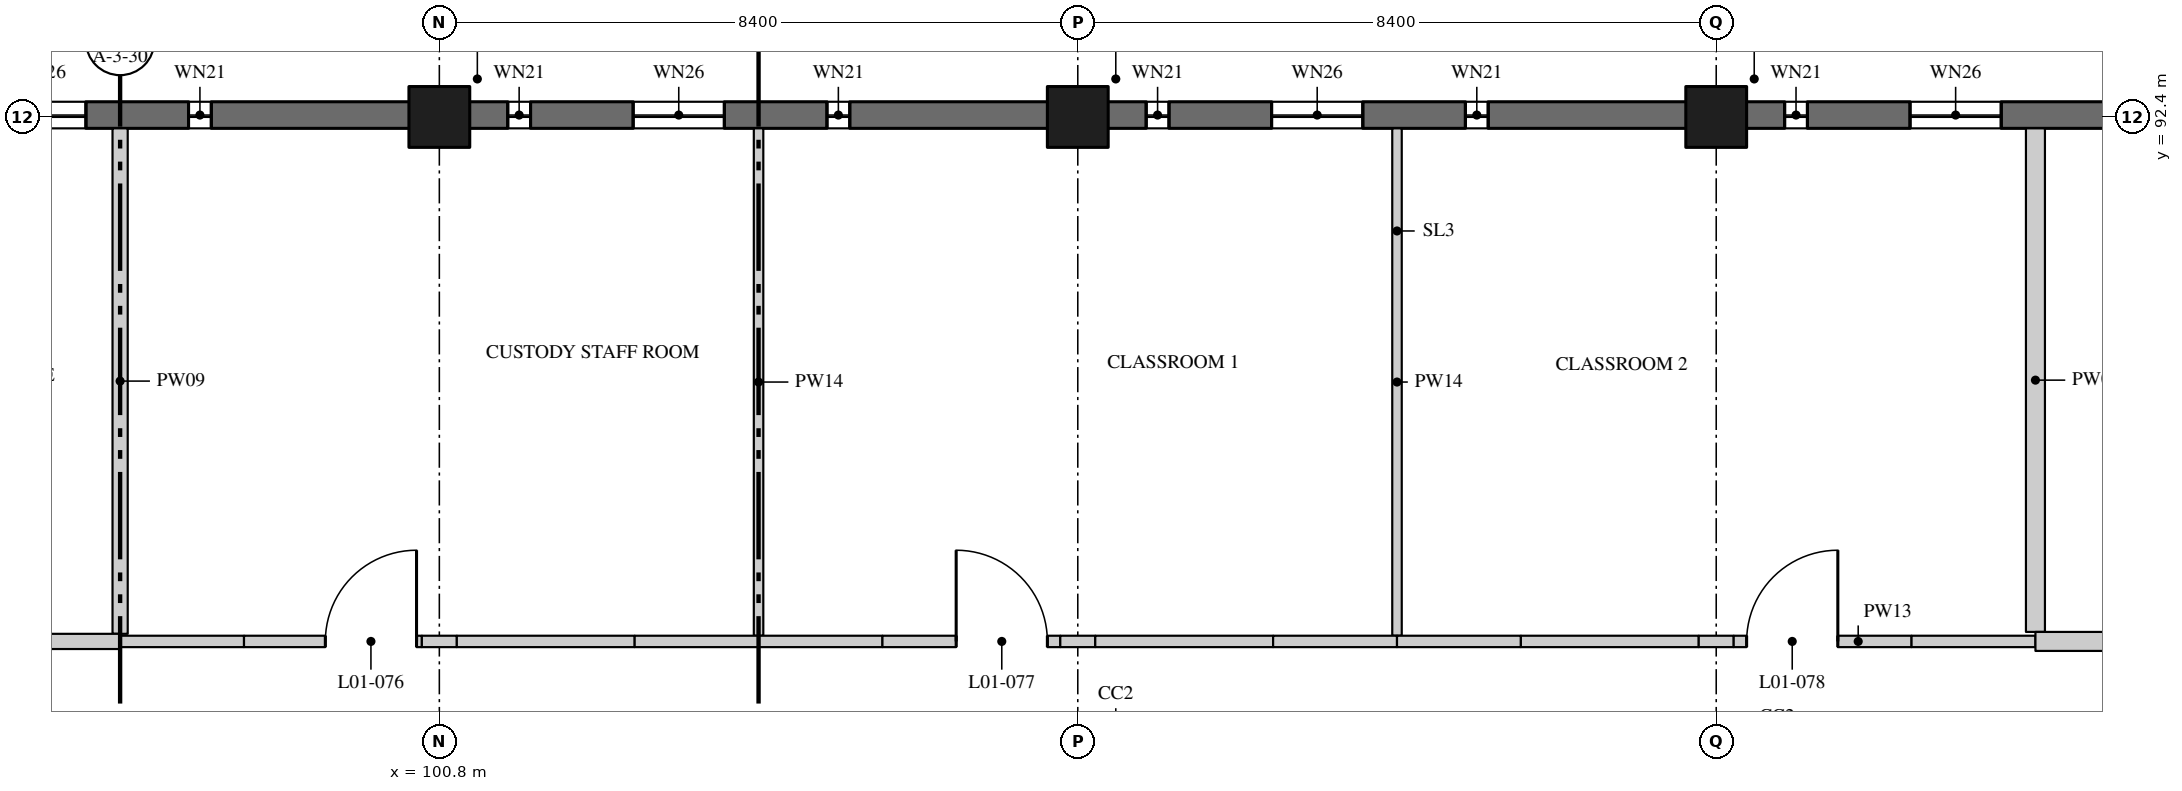
"""IFC4 building model, lengths in metres.
Left out: names, types, materials, properties, quantities, classifications, styles, units other than length and angle.
Written with IfcOpenShell. Run it as: python <this file> out.ifc"""

import sys

from ifc_helpers import new_model, si_unit, direction, frame, frame_2d, origin, origin_2d, place, context, subcontext, project, spatial, rectangle, extrude, element, fill, save


model = new_model("IFC4")
c1 = context("Model", 3, precision=1e-05, world=origin(), true_north=direction((0.0, 1.0)))
c2 = subcontext(c1, "Body", "Model", "MODEL_VIEW")
j1 = project(units=[si_unit("LENGTHUNIT", "METRE"), si_unit("PLANEANGLEUNIT", "RADIAN")], contexts=[c1])
p1 = place(None, origin())
s1 = spatial("IfcSite", under=j1, at=p1, CompositionType="ELEMENT")
p2 = place(p1, origin())
s2 = spatial("IfcBuilding", under=s1, at=p2, CompositionType="ELEMENT")
p3 = place(p2, frame((0.0, 0.0, 5.4)))
s3 = spatial("IfcBuildingStorey", under=s2, at=p3, CompositionType="ELEMENT", Elevation=5.4)
for number, where, z_axis, x_axis in (
    (1, (100.8, 92.4, 0.0), (0.0, 0.0, 1.0), (1.0, 0.0, 0.0)),
    (2, (109.2, 92.4, 0.0), (0.0, 0.0, 1.0), (1.0, 0.0, 0.0)),
    (3, (117.6, 92.4, 0.0), (0.0, 0.0, 1.0), (1.0, 0.0, 0.0)),
):
    element("IfcColumn", number, at=place(p3, frame(where, z_axis=z_axis, x_axis=x_axis)), inside=s3, PredefinedType="COLUMN", context=c2, shape_type="SweptSolid", body=[
        extrude(rectangle(XDim=0.8, YDim=0.8, at=origin_2d()), origin(), (0.0, 0.0, 1.0), 4.37),
    ])
p4 = place(p3, frame((96.6, 85.6, 0.0), z_axis=(0.0, 0.0, 1.0), x_axis=(0.0, 1.0, 0.0)))
e4 = element("IfcWall", 4, at=p4, inside=s3, PredefinedType="PARTITIONING", context=c2, shape_type="SweptSolid", body=[
    extrude(rectangle(XDim=6.65, YDim=0.2, at=frame_2d((3.325, 0.0))), origin(), (0.0, 0.0, 1.0), 4.37),
])
p5 = place(p3, frame((94.895, 85.5, 0.0), z_axis=(0.0, 0.0, 1.0), x_axis=(1.0, 0.0, 0.0)))
e5 = element("IfcWall", 5, at=p5, inside=s3, PredefinedType="PARTITIONING", context=c2, shape_type="SweptSolid", body=[
    extrude(rectangle(XDim=1.705, YDim=0.2, at=frame_2d((0.853, 0.0))), origin(), (0.0, 0.0, 1.0), 3.895),
])
p6 = place(p3, frame((105.0, 85.575, 0.0), z_axis=(0.0, 0.0, 1.0), x_axis=(0.0, 1.0, 0.0)))
e6 = element("IfcWall", 6, at=p6, inside=s3, PredefinedType="PARTITIONING", context=c2, shape_type="SweptSolid", body=[
    extrude(rectangle(XDim=6.675, YDim=0.125, at=frame_2d((3.337, 0.0))), origin(), (0.0, 0.0, 1.0), 4.37),
])
p7 = place(p3, frame((96.6, 85.5, 0.0), z_axis=(0.0, 0.0, 1.0), x_axis=(1.0, 0.0, 0.0)))
e7 = element("IfcWall", 7, at=p7, inside=s3, PredefinedType="PARTITIONING", context=c2, shape_type="SweptSolid", body=[
    extrude(rectangle(XDim=1.63, YDim=0.15, at=frame_2d((0.815, 0.0))), origin(), (0.0, 0.0, 1.0), 3.895),
])
p8 = place(p3, frame((98.23, 85.5, 0.0), z_axis=(0.0, 0.0, 1.0), x_axis=(1.0, 0.0, 0.0)))
e8 = element("IfcWall", 8, at=p8, inside=s3, PredefinedType="PARTITIONING", context=c2, shape_type="SweptSolid", body=[
    extrude(rectangle(XDim=2.34, YDim=0.15, at=frame_2d((1.17, 0.0))), origin(), (0.0, 0.0, 1.0), 4.37),
])
p9 = place(p8, frame((1.07, 0.0, 0.0)))
e9 = element("IfcOpeningElement", 9, at=p9, cuts=e8, PredefinedType="OPENING", context=c2, shape_type="SweptSolid", body=[
    extrude(rectangle(XDim=1.2, YDim=2.4, at=frame_2d((0.6, 1.2))), frame((0.0, 0.085, 0.0), z_axis=(0.0, -1.0, 0.0), x_axis=(1.0, 0.0, 0.0)), (0.0, 0.0, 1.0), 0.17),
])
p10 = place(p3, frame((100.57, 85.5, 0.0), z_axis=(0.0, 0.0, 1.0), x_axis=(1.0, 0.0, 0.0)))
e10 = element("IfcWall", 10, at=p10, inside=s3, PredefinedType="PARTITIONING", context=c2, shape_type="SweptSolid", body=[
    extrude(rectangle(XDim=0.46, YDim=0.15, at=frame_2d((0.23, 0.0))), origin(), (0.0, 0.0, 1.0), 3.746),
])
p11 = place(p3, frame((101.03, 85.5, 0.0), z_axis=(0.0, 0.0, 1.0), x_axis=(1.0, 0.0, 0.0)))
e11 = element("IfcWall", 11, at=p11, inside=s3, PredefinedType="PARTITIONING", context=c2, shape_type="SweptSolid", body=[
    extrude(rectangle(XDim=2.34, YDim=0.15, at=frame_2d((1.17, 0.0))), origin(), (0.0, 0.0, 1.0), 4.37),
])
p12 = place(p3, frame((103.37, 85.5, 0.0), z_axis=(0.0, 0.0, 1.0), x_axis=(1.0, 0.0, 0.0)))
e12 = element("IfcWall", 12, at=p12, inside=s3, PredefinedType="PARTITIONING", context=c2, shape_type="SweptSolid", body=[
    extrude(rectangle(XDim=1.63, YDim=0.15, at=frame_2d((0.815, 0.0))), origin(), (0.0, 0.0, 1.0), 3.895),
])
p13 = place(p3, frame((113.4, 85.575, 0.0), z_axis=(0.0, 0.0, 1.0), x_axis=(0.0, 1.0, 0.0)))
e13 = element("IfcWall", 13, at=p13, inside=s3, PredefinedType="PARTITIONING", context=c2, shape_type="SweptSolid", body=[
    extrude(rectangle(XDim=6.675, YDim=0.125, at=frame_2d((3.337, 0.0))), origin(), (0.0, 0.0, 1.0), 4.37),
])
p14 = place(p3, frame((105.0, 85.5, 0.0), z_axis=(0.0, 0.0, 1.0), x_axis=(1.0, 0.0, 0.0)))
e14 = element("IfcWall", 14, at=p14, inside=s3, PredefinedType="PARTITIONING", context=c2, shape_type="SweptSolid", body=[
    extrude(rectangle(XDim=1.63, YDim=0.15, at=frame_2d((0.815, 0.0))), origin(), (0.0, 0.0, 1.0), 3.895),
])
p15 = place(p3, frame((106.63, 85.5, 0.0), z_axis=(0.0, 0.0, 1.0), x_axis=(1.0, 0.0, 0.0)))
e15 = element("IfcWall", 15, at=p15, inside=s3, PredefinedType="PARTITIONING", context=c2, shape_type="SweptSolid", body=[
    extrude(rectangle(XDim=2.34, YDim=0.15, at=frame_2d((1.17, 0.0))), origin(), (0.0, 0.0, 1.0), 4.37),
])
p16 = place(p15, frame((0.97, 0.0, 0.0)))
e16 = element("IfcOpeningElement", 16, at=p16, cuts=e15, PredefinedType="OPENING", context=c2, shape_type="SweptSolid", body=[
    extrude(rectangle(XDim=1.2, YDim=2.4, at=frame_2d((0.6, 1.2))), frame((0.0, 0.085, 0.0), z_axis=(0.0, -1.0, 0.0), x_axis=(1.0, 0.0, 0.0)), (0.0, 0.0, 1.0), 0.17),
])
p17 = place(p3, frame((108.97, 85.5, 0.0), z_axis=(0.0, 0.0, 1.0), x_axis=(1.0, 0.0, 0.0)))
e17 = element("IfcWall", 17, at=p17, inside=s3, PredefinedType="PARTITIONING", context=c2, shape_type="SweptSolid", body=[
    extrude(rectangle(XDim=0.46, YDim=0.15, at=frame_2d((0.23, 0.0))), origin(), (0.0, 0.0, 1.0), 3.746),
])
p18 = place(p3, frame((109.43, 85.5, 0.0), z_axis=(0.0, 0.0, 1.0), x_axis=(1.0, 0.0, 0.0)))
e18 = element("IfcWall", 18, at=p18, inside=s3, PredefinedType="PARTITIONING", context=c2, shape_type="SweptSolid", body=[
    extrude(rectangle(XDim=2.34, YDim=0.15, at=frame_2d((1.17, 0.0))), origin(), (0.0, 0.0, 1.0), 4.37),
])
p19 = place(p3, frame((111.77, 85.5, 0.0), z_axis=(0.0, 0.0, 1.0), x_axis=(1.0, 0.0, 0.0)))
e19 = element("IfcWall", 19, at=p19, inside=s3, PredefinedType="PARTITIONING", context=c2, shape_type="SweptSolid", body=[
    extrude(rectangle(XDim=1.63, YDim=0.15, at=frame_2d((0.815, 0.0))), origin(), (0.0, 0.0, 1.0), 3.895),
])
p20 = place(p3, frame((121.8, 85.625, 0.0), z_axis=(0.0, 0.0, 1.0), x_axis=(0.0, 1.0, 0.0)))
e20 = element("IfcWall", 20, at=p20, inside=s3, PredefinedType="PARTITIONING", context=c2, shape_type="SweptSolid", body=[
    extrude(rectangle(XDim=6.625, YDim=0.25, at=frame_2d((3.312, 0.0))), origin(), (0.0, 0.0, 1.0), 4.37),
])
p21 = place(p3, frame((113.4, 85.5, 0.0), z_axis=(0.0, 0.0, 1.0), x_axis=(1.0, 0.0, 0.0)))
e21 = element("IfcWall", 21, at=p21, inside=s3, PredefinedType="PARTITIONING", context=c2, shape_type="SweptSolid", body=[
    extrude(rectangle(XDim=1.63, YDim=0.15, at=frame_2d((0.815, 0.0))), origin(), (0.0, 0.0, 1.0), 3.895),
])
p22 = place(p3, frame((115.03, 85.5, 0.0), z_axis=(0.0, 0.0, 1.0), x_axis=(1.0, 0.0, 0.0)))
e22 = element("IfcWall", 22, at=p22, inside=s3, PredefinedType="PARTITIONING", context=c2, shape_type="SweptSolid", body=[
    extrude(rectangle(XDim=2.34, YDim=0.15, at=frame_2d((1.17, 0.0))), origin(), (0.0, 0.0, 1.0), 4.37),
])
p23 = place(p3, frame((117.37, 85.5, 0.0), z_axis=(0.0, 0.0, 1.0), x_axis=(1.0, 0.0, 0.0)))
e23 = element("IfcWall", 23, at=p23, inside=s3, PredefinedType="PARTITIONING", context=c2, shape_type="SweptSolid", body=[
    extrude(rectangle(XDim=0.46, YDim=0.15, at=frame_2d((0.23, 0.0))), origin(), (0.0, 0.0, 1.0), 3.746),
])
p24 = place(p3, frame((117.83, 85.5, 0.0), z_axis=(0.0, 0.0, 1.0), x_axis=(1.0, 0.0, 0.0)))
e24 = element("IfcWall", 24, at=p24, inside=s3, PredefinedType="PARTITIONING", context=c2, shape_type="SweptSolid", body=[
    extrude(rectangle(XDim=2.34, YDim=0.15, at=frame_2d((1.17, 0.0))), origin(), (0.0, 0.0, 1.0), 4.37),
])
p25 = place(p24, frame((0.17, 0.0, 0.0)))
e25 = element("IfcOpeningElement", 25, at=p25, cuts=e24, PredefinedType="OPENING", context=c2, shape_type="SweptSolid", body=[
    extrude(rectangle(XDim=1.2, YDim=2.4, at=frame_2d((0.6, 1.2))), frame((0.0, 0.085, 0.0), z_axis=(0.0, -1.0, 0.0), x_axis=(1.0, 0.0, 0.0)), (0.0, 0.0, 1.0), 0.17),
])
p26 = place(p3, frame((120.17, 85.5, 0.0), z_axis=(0.0, 0.0, 1.0), x_axis=(1.0, 0.0, 0.0)))
e26 = element("IfcWall", 26, at=p26, inside=s3, PredefinedType="PARTITIONING", context=c2, shape_type="SweptSolid", body=[
    extrude(rectangle(XDim=1.63, YDim=0.15, at=frame_2d((0.815, 0.0))), origin(), (0.0, 0.0, 1.0), 3.895),
])
p27 = place(p3, frame((121.8, 85.5, 0.0), z_axis=(0.0, 0.0, 1.0), x_axis=(1.0, 0.0, 0.0)))
e27 = element("IfcWall", 27, at=p27, inside=s3, PredefinedType="PARTITIONING", context=c2, shape_type="SweptSolid", body=[
    extrude(rectangle(XDim=1.78, YDim=0.25, at=frame_2d((0.89, 0.0))), origin(), (0.0, 0.0, 1.0), 3.895),
])
p28 = place(p3, frame((125.62, 92.425, 0.0), z_axis=(0.0, 0.0, 1.0), x_axis=(-1.0, 0.0, 0.0)))
e28 = element("IfcWall", 28, at=p28, inside=s3, PredefinedType="SOLIDWALL", context=c2, shape_type="SweptSolid", body=[
    extrude(rectangle(XDim=7.64, YDim=0.35, at=frame_2d((3.82, 0.0))), origin(), (0.0, 0.0, 1.0), 3.746),
])
p29 = place(p28, frame((4.27, 0.0, 1.5)))
e29 = element("IfcOpeningElement", 29, at=p29, cuts=e28, PredefinedType="OPENING", context=c2, shape_type="SweptSolid", body=[
    extrude(rectangle(XDim=1.2, YDim=1.8, at=frame_2d((0.6, 0.9))), frame((0.0, 0.185, 0.0), z_axis=(0.0, -1.0, 0.0), x_axis=(1.0, 0.0, 0.0)), (0.0, 0.0, 1.0), 0.37),
])
p30 = place(p28, frame((6.82, 0.0, 1.5)))
e30 = element("IfcOpeningElement", 30, at=p30, cuts=e28, PredefinedType="OPENING", context=c2, shape_type="SweptSolid", body=[
    extrude(rectangle(XDim=0.3, YDim=1.5, at=frame_2d((0.15, 0.75))), frame((0.0, 0.185, 0.0), z_axis=(0.0, -1.0, 0.0), x_axis=(1.0, 0.0, 0.0)), (0.0, 0.0, 1.0), 0.37),
])
p31 = place(p3, frame((117.22, 92.425, 0.0), z_axis=(0.0, 0.0, 1.0), x_axis=(-1.0, 0.0, 0.0)))
e31 = element("IfcWall", 31, at=p31, inside=s3, PredefinedType="SOLIDWALL", context=c2, shape_type="SweptSolid", body=[
    extrude(rectangle(XDim=7.64, YDim=0.35, at=frame_2d((3.82, 0.0))), origin(), (0.0, 0.0, 1.0), 3.746),
])
p32 = place(p31, frame((2.62, 0.0, 1.5)))
e32 = element("IfcOpeningElement", 32, at=p32, cuts=e31, PredefinedType="OPENING", context=c2, shape_type="SweptSolid", body=[
    extrude(rectangle(XDim=0.3, YDim=1.5, at=frame_2d((0.15, 0.75))), frame((0.0, 0.185, 0.0), z_axis=(0.0, -1.0, 0.0), x_axis=(1.0, 0.0, 0.0)), (0.0, 0.0, 1.0), 0.37),
])
p33 = place(p31, frame((4.27, 0.0, 1.5)))
e33 = element("IfcOpeningElement", 33, at=p33, cuts=e31, PredefinedType="OPENING", context=c2, shape_type="SweptSolid", body=[
    extrude(rectangle(XDim=1.2, YDim=1.8, at=frame_2d((0.6, 0.9))), frame((0.0, 0.185, 0.0), z_axis=(0.0, -1.0, 0.0), x_axis=(1.0, 0.0, 0.0)), (0.0, 0.0, 1.0), 0.37),
])
p34 = place(p31, frame((6.82, 0.0, 1.5)))
e34 = element("IfcOpeningElement", 34, at=p34, cuts=e31, PredefinedType="OPENING", context=c2, shape_type="SweptSolid", body=[
    extrude(rectangle(XDim=0.3, YDim=1.5, at=frame_2d((0.15, 0.75))), frame((0.0, 0.185, 0.0), z_axis=(0.0, -1.0, 0.0), x_axis=(1.0, 0.0, 0.0)), (0.0, 0.0, 1.0), 0.37),
])
p35 = place(p3, frame((108.82, 92.425, 0.0), z_axis=(0.0, 0.0, 1.0), x_axis=(-1.0, 0.0, 0.0)))
e35 = element("IfcWall", 35, at=p35, inside=s3, PredefinedType="SOLIDWALL", context=c2, shape_type="SweptSolid", body=[
    extrude(rectangle(XDim=7.64, YDim=0.35, at=frame_2d((3.82, 0.0))), origin(), (0.0, 0.0, 1.0), 3.746),
])
p36 = place(p35, frame((2.62, 0.0, 1.5)))
e36 = element("IfcOpeningElement", 36, at=p36, cuts=e35, PredefinedType="OPENING", context=c2, shape_type="SweptSolid", body=[
    extrude(rectangle(XDim=0.3, YDim=1.5, at=frame_2d((0.15, 0.75))), frame((0.0, 0.185, 0.0), z_axis=(0.0, -1.0, 0.0), x_axis=(1.0, 0.0, 0.0)), (0.0, 0.0, 1.0), 0.37),
])
p37 = place(p35, frame((4.27, 0.0, 1.5)))
e37 = element("IfcOpeningElement", 37, at=p37, cuts=e35, PredefinedType="OPENING", context=c2, shape_type="SweptSolid", body=[
    extrude(rectangle(XDim=1.2, YDim=1.8, at=frame_2d((0.6, 0.9))), frame((0.0, 0.185, 0.0), z_axis=(0.0, -1.0, 0.0), x_axis=(1.0, 0.0, 0.0)), (0.0, 0.0, 1.0), 0.37),
])
p38 = place(p35, frame((6.82, 0.0, 1.5)))
e38 = element("IfcOpeningElement", 38, at=p38, cuts=e35, PredefinedType="OPENING", context=c2, shape_type="SweptSolid", body=[
    extrude(rectangle(XDim=0.3, YDim=1.5, at=frame_2d((0.15, 0.75))), frame((0.0, 0.185, 0.0), z_axis=(0.0, -1.0, 0.0), x_axis=(1.0, 0.0, 0.0)), (0.0, 0.0, 1.0), 0.37),
])
p39 = place(p3, frame((100.42, 92.425, 0.0), z_axis=(0.0, 0.0, 1.0), x_axis=(-1.0, 0.0, 0.0)))
e39 = element("IfcWall", 39, at=p39, inside=s3, PredefinedType="SOLIDWALL", context=c2, shape_type="SweptSolid", body=[
    extrude(rectangle(XDim=7.64, YDim=0.35, at=frame_2d((3.82, 0.0))), origin(), (0.0, 0.0, 1.0), 3.746),
])
p40 = place(p39, frame((2.62, 0.0, 1.5)))
e40 = element("IfcOpeningElement", 40, at=p40, cuts=e39, PredefinedType="OPENING", context=c2, shape_type="SweptSolid", body=[
    extrude(rectangle(XDim=0.3, YDim=1.5, at=frame_2d((0.15, 0.75))), frame((0.0, 0.185, 0.0), z_axis=(0.0, -1.0, 0.0), x_axis=(1.0, 0.0, 0.0)), (0.0, 0.0, 1.0), 0.37),
])
p41 = place(p39, frame((4.27, 0.0, 1.5)))
e41 = element("IfcOpeningElement", 41, at=p41, cuts=e39, PredefinedType="OPENING", context=c2, shape_type="SweptSolid", body=[
    extrude(rectangle(XDim=1.2, YDim=1.8, at=frame_2d((0.6, 0.9))), frame((0.0, 0.185, 0.0), z_axis=(0.0, -1.0, 0.0), x_axis=(1.0, 0.0, 0.0)), (0.0, 0.0, 1.0), 0.37),
])
p42 = place(p39, frame((6.82, 0.0, 1.5)))
e42 = element("IfcOpeningElement", 42, at=p42, cuts=e39, PredefinedType="OPENING", context=c2, shape_type="SweptSolid", body=[
    extrude(rectangle(XDim=0.3, YDim=1.5, at=frame_2d((0.15, 0.75))), frame((0.0, 0.185, 0.0), z_axis=(0.0, -1.0, 0.0), x_axis=(1.0, 0.0, 0.0)), (0.0, 0.0, 1.0), 0.37),
])
p43 = place(p9, origin())
e43 = element("IfcDoor", 43, at=p43, inside=s3, OperationType="SINGLE_SWING_LEFT", PredefinedType="DOOR", context=c2, shape_type="SweptSolid", body=[
    extrude(rectangle(XDim=1.2, YDim=2.4, at=frame_2d((0.6, 1.2))), frame((0.0, 0.025, 0.0), z_axis=(0.0, -1.0, 0.0), x_axis=(1.0, 0.0, 0.0)), (0.0, 0.0, 1.0), 0.05),
])
fill(e9, e43)
p44 = place(p16, origin())
e44 = element("IfcDoor", 44, at=p44, inside=s3, OperationType="SINGLE_SWING_RIGHT", PredefinedType="DOOR", context=c2, shape_type="SweptSolid", body=[
    extrude(rectangle(XDim=1.2, YDim=2.4, at=frame_2d((0.6, 1.2))), frame((0.0, 0.025, 0.0), z_axis=(0.0, -1.0, 0.0), x_axis=(1.0, 0.0, 0.0)), (0.0, 0.0, 1.0), 0.05),
])
fill(e16, e44)
p45 = place(p25, origin())
e45 = element("IfcDoor", 45, at=p45, inside=s3, OperationType="SINGLE_SWING_LEFT", PredefinedType="DOOR", context=c2, shape_type="SweptSolid", body=[
    extrude(rectangle(XDim=1.2, YDim=2.4, at=frame_2d((0.6, 1.2))), frame((0.0, 0.025, 0.0), z_axis=(0.0, -1.0, 0.0), x_axis=(1.0, 0.0, 0.0)), (0.0, 0.0, 1.0), 0.05),
])
fill(e25, e45)
p46 = place(p29, origin())
e46 = element("IfcWindow", 46, at=p46, inside=s3, PartitioningType="SINGLE_PANEL", PredefinedType="WINDOW", context=c2, shape_type="SweptSolid", body=[
    extrude(rectangle(XDim=1.2, YDim=1.8, at=frame_2d((0.6, 0.9))), frame((0.0, 0.03, 0.0), z_axis=(0.0, -1.0, 0.0), x_axis=(1.0, 0.0, 0.0)), (0.0, 0.0, 1.0), 0.06),
])
fill(e29, e46)
p47 = place(p30, origin())
e47 = element("IfcWindow", 47, at=p47, inside=s3, PartitioningType="SINGLE_PANEL", PredefinedType="WINDOW", context=c2, shape_type="SweptSolid", body=[
    extrude(rectangle(XDim=0.3, YDim=1.5, at=frame_2d((0.15, 0.75))), frame((0.0, 0.05, 0.0), z_axis=(0.0, -1.0, 0.0), x_axis=(1.0, 0.0, 0.0)), (0.0, 0.0, 1.0), 0.1),
])
fill(e30, e47)
p48 = place(p32, origin())
e48 = element("IfcWindow", 48, at=p48, inside=s3, PartitioningType="SINGLE_PANEL", PredefinedType="WINDOW", context=c2, shape_type="SweptSolid", body=[
    extrude(rectangle(XDim=0.3, YDim=1.5, at=frame_2d((0.15, 0.75))), frame((0.0, 0.05, 0.0), z_axis=(0.0, -1.0, 0.0), x_axis=(1.0, 0.0, 0.0)), (0.0, 0.0, 1.0), 0.1),
])
fill(e32, e48)
p49 = place(p33, origin())
e49 = element("IfcWindow", 49, at=p49, inside=s3, PartitioningType="SINGLE_PANEL", PredefinedType="WINDOW", context=c2, shape_type="SweptSolid", body=[
    extrude(rectangle(XDim=1.2, YDim=1.8, at=frame_2d((0.6, 0.9))), frame((0.0, 0.03, 0.0), z_axis=(0.0, -1.0, 0.0), x_axis=(1.0, 0.0, 0.0)), (0.0, 0.0, 1.0), 0.06),
])
fill(e33, e49)
p50 = place(p34, origin())
e50 = element("IfcWindow", 50, at=p50, inside=s3, PartitioningType="SINGLE_PANEL", PredefinedType="WINDOW", context=c2, shape_type="SweptSolid", body=[
    extrude(rectangle(XDim=0.3, YDim=1.5, at=frame_2d((0.15, 0.75))), frame((0.0, 0.05, 0.0), z_axis=(0.0, -1.0, 0.0), x_axis=(1.0, 0.0, 0.0)), (0.0, 0.0, 1.0), 0.1),
])
fill(e34, e50)
p51 = place(p36, origin())
e51 = element("IfcWindow", 51, at=p51, inside=s3, PartitioningType="SINGLE_PANEL", PredefinedType="WINDOW", context=c2, shape_type="SweptSolid", body=[
    extrude(rectangle(XDim=0.3, YDim=1.5, at=frame_2d((0.15, 0.75))), frame((0.0, 0.05, 0.0), z_axis=(0.0, -1.0, 0.0), x_axis=(1.0, 0.0, 0.0)), (0.0, 0.0, 1.0), 0.1),
])
fill(e36, e51)
p52 = place(p37, origin())
e52 = element("IfcWindow", 52, at=p52, inside=s3, PartitioningType="SINGLE_PANEL", PredefinedType="WINDOW", context=c2, shape_type="SweptSolid", body=[
    extrude(rectangle(XDim=1.2, YDim=1.8, at=frame_2d((0.6, 0.9))), frame((0.0, 0.03, 0.0), z_axis=(0.0, -1.0, 0.0), x_axis=(1.0, 0.0, 0.0)), (0.0, 0.0, 1.0), 0.06),
])
fill(e37, e52)
p53 = place(p38, origin())
e53 = element("IfcWindow", 53, at=p53, inside=s3, PartitioningType="SINGLE_PANEL", PredefinedType="WINDOW", context=c2, shape_type="SweptSolid", body=[
    extrude(rectangle(XDim=0.3, YDim=1.5, at=frame_2d((0.15, 0.75))), frame((0.0, 0.05, 0.0), z_axis=(0.0, -1.0, 0.0), x_axis=(1.0, 0.0, 0.0)), (0.0, 0.0, 1.0), 0.1),
])
fill(e38, e53)
p54 = place(p40, origin())
e54 = element("IfcWindow", 54, at=p54, inside=s3, PartitioningType="SINGLE_PANEL", PredefinedType="WINDOW", context=c2, shape_type="SweptSolid", body=[
    extrude(rectangle(XDim=0.3, YDim=1.5, at=frame_2d((0.15, 0.75))), frame((0.0, 0.05, 0.0), z_axis=(0.0, -1.0, 0.0), x_axis=(1.0, 0.0, 0.0)), (0.0, 0.0, 1.0), 0.1),
])
fill(e40, e54)
p55 = place(p41, origin())
e55 = element("IfcWindow", 55, at=p55, inside=s3, PartitioningType="SINGLE_PANEL", PredefinedType="WINDOW", context=c2, shape_type="SweptSolid", body=[
    extrude(rectangle(XDim=1.2, YDim=1.8, at=frame_2d((0.6, 0.9))), frame((0.0, 0.03, 0.0), z_axis=(0.0, -1.0, 0.0), x_axis=(1.0, 0.0, 0.0)), (0.0, 0.0, 1.0), 0.06),
])
fill(e41, e55)
save(model, sys.argv[1])
